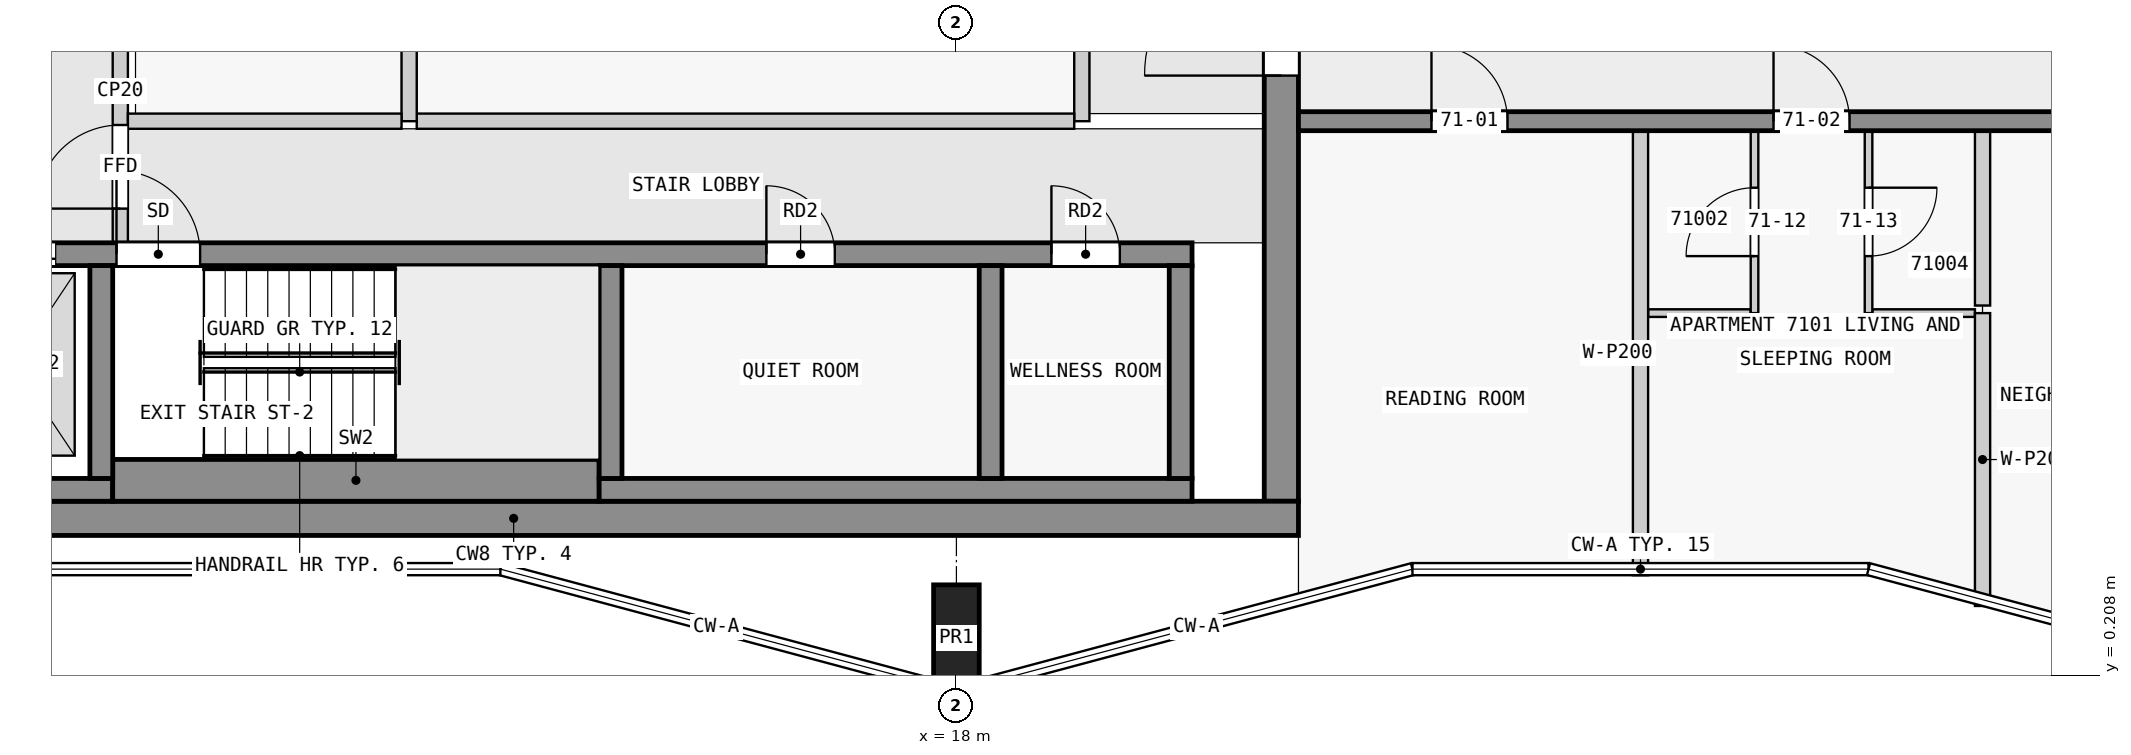
"""IFC4 building model, lengths in metres.
Left out: names, types, materials, properties, quantities, classifications, styles, units other than length and angle.
Written with IfcOpenShell. Run it as: python <this file> out.ifc"""

import sys

from ifc_helpers import new_model, si_unit, direction, frame, frame_2d, origin, origin_2d, place, context, subcontext, project, spatial, rectangle, extrude, element, fill, save


model = new_model("IFC4")
c1 = context("Model", 3, precision=1e-05, world=origin(), true_north=direction((0.0, 1.0)))
c2 = subcontext(c1, "Body", "Model", "MODEL_VIEW")
j1 = project(units=[si_unit("LENGTHUNIT", "METRE"), si_unit("PLANEANGLEUNIT", "RADIAN")], contexts=[c1])
p1 = place(None, origin())
s1 = spatial("IfcSite", under=j1, at=p1, CompositionType="ELEMENT")
p2 = place(p1, origin())
s2 = spatial("IfcBuilding", under=s1, at=p2, CompositionType="ELEMENT")
p3 = place(p2, frame((0.0, 0.0, 270.4)))
s3 = spatial("IfcBuildingStorey", under=s2, at=p3, CompositionType="ELEMENT", Elevation=270.4)
p4 = place(p3, frame((18.0, 0.7, 0.0), z_axis=(0.0, 0.0, 1.0), x_axis=(1.0, 0.0, 0.0)))
e1 = element("IfcColumn", 1, at=p4, inside=s3, PredefinedType="COLUMN", context=c2, shape_type="SweptSolid", body=[
    extrude(rectangle(XDim=0.6, YDim=1.4, at=origin_2d()), origin(), (0.0, 0.0, 1.0), 3.5),
])
p5 = place(p3, frame((1.85, 2.275, 0.0), z_axis=(0.0, 0.0, 1.0), x_axis=(1.0, 0.0, 0.0)))
e2 = element("IfcWall", 2, at=p5, inside=s3, PredefinedType="SHEAR", context=c2, shape_type="SweptSolid", body=[
    extrude(rectangle(XDim=20.65, YDim=0.45, at=frame_2d((10.325, 0.0))), origin(), (0.0, 0.0, 1.0), 3.25),
])
p6 = place(p3, frame((22.275, 2.5, 0.0), z_axis=(0.0, 0.0, 1.0), x_axis=(0.0, 1.0, 0.0)))
e3 = element("IfcWall", 3, at=p6, inside=s3, PredefinedType="SHEAR", context=c2, shape_type="SweptSolid", body=[
    extrude(rectangle(XDim=15.05, YDim=0.45, at=frame_2d((7.525, 0.0))), origin(), (0.0, 0.0, 1.0), 3.25),
])
p7 = place(p6, frame((5.6, 0.0, 0.0)))
e4 = element("IfcOpeningElement", 4, at=p7, cuts=e3, PredefinedType="OPENING", context=c2, shape_type="SweptSolid", body=[
    extrude(rectangle(XDim=1.8, YDim=2.1, at=frame_2d((0.9, 1.05))), frame((0.0, 0.235, 0.0), z_axis=(0.0, -1.0, 0.0), x_axis=(1.0, 0.0, 0.0)), (0.0, 0.0, 1.0), 0.47),
])
p8 = place(p3, frame((2.3, 2.65, 0.0), z_axis=(0.0, 0.0, 1.0), x_axis=(1.0, 0.0, 0.0)))
e5 = element("IfcWall", 5, at=p8, inside=s3, PredefinedType="SHEAR", context=c2, shape_type="SweptSolid", body=[
    extrude(rectangle(XDim=4.6, YDim=0.3, at=frame_2d((2.3, 0.0))), origin(), (0.0, 0.0, 1.0), 3.25),
])
p9 = place(p3, frame((6.9, 2.775, 0.0), z_axis=(0.0, 0.0, 1.0), x_axis=(1.0, 0.0, 0.0)))
e6 = element("IfcWall", 6, at=p9, inside=s3, PredefinedType="SHEAR", context=c2, shape_type="SweptSolid", body=[
    extrude(rectangle(XDim=6.4, YDim=0.55, at=frame_2d((3.2, 0.0))), origin(), (0.0, 0.0, 1.0), 3.25),
])
p10 = place(p3, frame((13.3, 2.65, 0.0), z_axis=(0.0, 0.0, 1.0), x_axis=(1.0, 0.0, 0.0)))
e7 = element("IfcWall", 7, at=p10, inside=s3, PredefinedType="SHEAR", context=c2, shape_type="SweptSolid", body=[
    extrude(rectangle(XDim=7.8, YDim=0.3, at=frame_2d((3.9, 0.0))), origin(), (0.0, 0.0, 1.0), 3.25),
])
for number, where, z_axis, x_axis in (
    (8, (6.75, 2.8, 0.0), (0.0, 0.0, 1.0), (0.0, 1.0, 0.0)),
    (9, (13.45, 2.8, 0.0), (0.0, 0.0, 1.0), (0.0, 1.0, 0.0)),
    (10, (18.45, 2.8, 0.0), (0.0, 0.0, 1.0), (0.0, 1.0, 0.0)),
    (11, (20.95, 2.8, 0.0), (0.0, 0.0, 1.0), (0.0, 1.0, 0.0)),
):
    element("IfcWall", number, at=place(p3, frame(where, z_axis=z_axis, x_axis=x_axis)), inside=s3, PredefinedType="SHEAR", context=c2, shape_type="SweptSolid", body=[
        extrude(rectangle(XDim=2.8, YDim=0.3, at=frame_2d((1.4, 0.0))), origin(), (0.0, 0.0, 1.0), 3.25),
    ])
p11 = place(p3, frame((2.3, 5.75, 0.0), z_axis=(0.0, 0.0, 1.0), x_axis=(1.0, 0.0, 0.0)))
e12 = element("IfcWall", 12, at=p11, inside=s3, PredefinedType="SHEAR", context=c2, shape_type="SweptSolid", body=[
    extrude(rectangle(XDim=18.8, YDim=0.3, at=frame_2d((9.4, 0.0))), origin(), (0.0, 0.0, 1.0), 3.25),
])
p12 = place(p11, frame((4.65, 0.0, 0.0)))
e13 = element("IfcOpeningElement", 13, at=p12, cuts=e12, PredefinedType="OPENING", context=c2, shape_type="SweptSolid", body=[
    extrude(rectangle(XDim=1.1, YDim=2.1, at=frame_2d((0.55, 1.05))), frame((0.0, 0.16, 0.0), z_axis=(0.0, -1.0, 0.0), x_axis=(1.0, 0.0, 0.0)), (0.0, 0.0, 1.0), 0.32),
])
p13 = place(p11, frame((0.45, 0.0, 0.0)))
e14 = element("IfcOpeningElement", 14, at=p13, cuts=e12, PredefinedType="OPENING", context=c2, shape_type="SweptSolid", body=[
    extrude(rectangle(XDim=1.1, YDim=2.1, at=frame_2d((0.55, 1.05))), frame((0.0, 0.16, 0.0), z_axis=(0.0, -1.0, 0.0), x_axis=(1.0, 0.0, 0.0)), (0.0, 0.0, 1.0), 0.32),
])
p14 = place(p11, frame((2.75, 0.0, 0.0)))
e15 = element("IfcOpeningElement", 15, at=p14, cuts=e12, PredefinedType="OPENING", context=c2, shape_type="SweptSolid", body=[
    extrude(rectangle(XDim=1.1, YDim=2.1, at=frame_2d((0.55, 1.05))), frame((0.0, 0.16, 0.0), z_axis=(0.0, -1.0, 0.0), x_axis=(1.0, 0.0, 0.0)), (0.0, 0.0, 1.0), 0.32),
])
p15 = place(p11, frame((13.2, 0.0, 0.0)))
e16 = element("IfcOpeningElement", 16, at=p15, cuts=e12, PredefinedType="OPENING", context=c2, shape_type="SweptSolid", body=[
    extrude(rectangle(XDim=0.9, YDim=2.1, at=frame_2d((0.45, 1.05))), frame((0.0, 0.16, 0.0), z_axis=(0.0, -1.0, 0.0), x_axis=(1.0, 0.0, 0.0)), (0.0, 0.0, 1.0), 0.32),
])
p16 = place(p11, frame((16.95, 0.0, 0.0)))
e17 = element("IfcOpeningElement", 17, at=p16, cuts=e12, PredefinedType="OPENING", context=c2, shape_type="SweptSolid", body=[
    extrude(rectangle(XDim=0.9, YDim=2.1, at=frame_2d((0.45, 1.05))), frame((0.0, 0.16, 0.0), z_axis=(0.0, -1.0, 0.0), x_axis=(1.0, 0.0, 0.0)), (0.0, 0.0, 1.0), 0.32),
])
p17 = place(p3, frame((22.5, 7.5, 0.0), z_axis=(0.0, 0.0, 1.0), x_axis=(1.0, 0.0, 0.0)))
e18 = element("IfcWall", 18, at=p17, inside=s3, PredefinedType="SHEAR", context=c2, shape_type="SweptSolid", body=[
    extrude(rectangle(XDim=22.5, YDim=0.25, at=frame_2d((11.25, 0.0))), origin(), (0.0, 0.0, 1.0), 3.25),
])
p18 = place(p17, frame((1.75, 0.0, 0.0)))
e19 = element("IfcOpeningElement", 19, at=p18, cuts=e18, PredefinedType="OPENING", context=c2, shape_type="SweptSolid", body=[
    extrude(rectangle(XDim=1.0, YDim=2.1, at=frame_2d((0.5, 1.05))), frame((0.0, 0.135, 0.0), z_axis=(0.0, -1.0, 0.0), x_axis=(1.0, 0.0, 0.0)), (0.0, 0.0, 1.0), 0.27),
])
p19 = place(p17, frame((6.25, 0.0, 0.0)))
e20 = element("IfcOpeningElement", 20, at=p19, cuts=e18, PredefinedType="OPENING", context=c2, shape_type="SweptSolid", body=[
    extrude(rectangle(XDim=1.0, YDim=2.1, at=frame_2d((0.5, 1.05))), frame((0.0, 0.135, 0.0), z_axis=(0.0, -1.0, 0.0), x_axis=(1.0, 0.0, 0.0)), (0.0, 0.0, 1.0), 0.27),
])
p20 = place(p17, frame((10.35, 0.0, 0.0)))
e21 = element("IfcOpeningElement", 21, at=p20, cuts=e18, PredefinedType="OPENING", context=c2, shape_type="SweptSolid", body=[
    extrude(rectangle(XDim=1.8, YDim=2.1, at=frame_2d((0.9, 1.05))), frame((0.0, 0.135, 0.0), z_axis=(0.0, -1.0, 0.0), x_axis=(1.0, 0.0, 0.0)), (0.0, 0.0, 1.0), 0.27),
])
p21 = place(p17, frame((15.25, 0.0, 0.0)))
e22 = element("IfcOpeningElement", 22, at=p21, cuts=e18, PredefinedType="OPENING", context=c2, shape_type="SweptSolid", body=[
    extrude(rectangle(XDim=1.0, YDim=2.1, at=frame_2d((0.5, 1.05))), frame((0.0, 0.135, 0.0), z_axis=(0.0, -1.0, 0.0), x_axis=(1.0, 0.0, 0.0)), (0.0, 0.0, 1.0), 0.27),
])
p22 = place(p17, frame((18.75, 0.0, 0.0)))
e23 = element("IfcOpeningElement", 23, at=p22, cuts=e18, PredefinedType="OPENING", context=c2, shape_type="SweptSolid", body=[
    extrude(rectangle(XDim=0.9, YDim=2.1, at=frame_2d((0.45, 1.05))), frame((0.0, 0.135, 0.0), z_axis=(0.0, -1.0, 0.0), x_axis=(1.0, 0.0, 0.0)), (0.0, 0.0, 1.0), 0.27),
])
p23 = place(p17, frame((20.95, 0.0, 0.0)))
e24 = element("IfcOpeningElement", 24, at=p23, cuts=e18, PredefinedType="OPENING", context=c2, shape_type="SweptSolid", body=[
    extrude(rectangle(XDim=1.0, YDim=2.1, at=frame_2d((0.5, 1.05))), frame((0.0, 0.135, 0.0), z_axis=(0.0, -1.0, 0.0), x_axis=(1.0, 0.0, 0.0)), (0.0, 0.0, 1.0), 0.27),
])
p24 = place(p3, frame((7.0, 5.9, 0.0), z_axis=(0.0, 0.0, 1.0), x_axis=(0.0, 1.0, 0.0)))
e25 = element("IfcWall", 25, at=p24, inside=s3, PredefinedType="PARTITIONING", context=c2, shape_type="SweptSolid", body=[
    extrude(rectangle(XDim=4.0, YDim=0.2, at=frame_2d((2.0, 0.0))), origin(), (0.0, 0.0, 1.0), 3.25),
])
p25 = place(p24, frame((0.45, 0.0, 0.0)))
e26 = element("IfcOpeningElement", 26, at=p25, cuts=e25, PredefinedType="OPENING", context=c2, shape_type="SweptSolid", body=[
    extrude(rectangle(XDim=1.1, YDim=2.1, at=frame_2d((0.55, 1.05))), frame((0.0, 0.11, 0.0), z_axis=(0.0, -1.0, 0.0), x_axis=(1.0, 0.0, 0.0)), (0.0, 0.0, 1.0), 0.22),
])
p26 = place(p3, frame((7.1, 7.5, 0.0), z_axis=(0.0, 0.0, 1.0), x_axis=(1.0, 0.0, 0.0)))
e27 = element("IfcWall", 27, at=p26, inside=s3, PredefinedType="PARTITIONING", context=c2, shape_type="SweptSolid", body=[
    extrude(rectangle(XDim=3.6, YDim=0.2, at=frame_2d((1.8, 0.0))), origin(), (0.0, 0.0, 1.0), 3.25),
])
p27 = place(p3, frame((10.8, 7.5, 0.0), z_axis=(0.0, 0.0, 1.0), x_axis=(0.0, 1.0, 0.0)))
e28 = element("IfcWall", 28, at=p27, inside=s3, PredefinedType="PARTITIONING", context=c2, shape_type="SweptSolid", body=[
    extrude(rectangle(XDim=4.7, YDim=0.2, at=frame_2d((2.35, 0.0))), origin(), (0.0, 0.0, 1.0), 3.25),
])
p28 = place(p3, frame((10.9, 7.5, 0.0), z_axis=(0.0, 0.0, 1.0), x_axis=(1.0, 0.0, 0.0)))
e29 = element("IfcWall", 29, at=p28, inside=s3, PredefinedType="PARTITIONING", context=c2, shape_type="SweptSolid", body=[
    extrude(rectangle(XDim=8.65, YDim=0.2, at=frame_2d((4.325, 0.0))), origin(), (0.0, 0.0, 1.0), 3.25),
])
p29 = place(p3, frame((19.65, 7.5, 0.0), z_axis=(0.0, 0.0, 1.0), x_axis=(0.0, 1.0, 0.0)))
e30 = element("IfcWall", 30, at=p29, inside=s3, PredefinedType="PARTITIONING", context=c2, shape_type="SweptSolid", body=[
    extrude(rectangle(XDim=4.7, YDim=0.2, at=frame_2d((2.35, 0.0))), origin(), (0.0, 0.0, 1.0), 3.25),
])
for number, where, z_axis, x_axis in (
    (31, (27.1, 4.975, 0.0), (0.0, 0.0, 1.0), (1.0, 0.0, 0.0)),
    (32, (30.05, 4.975, 0.0), (0.0, 0.0, 1.0), (1.0, 0.0, 0.0)),
):
    element("IfcWall", number, at=place(p3, frame(where, z_axis=z_axis, x_axis=x_axis)), inside=s3, PredefinedType="PARTITIONING", context=c2, shape_type="SweptSolid", body=[
        extrude(rectangle(XDim=1.35, YDim=0.1, at=frame_2d((0.675, 0.0))), origin(), (0.0, 0.0, 1.0), 3.25),
    ])
p30 = place(p3, frame((27.0, 1.527, 0.0), z_axis=(0.0, 0.0, 1.0), x_axis=(0.0, 1.0, 0.0)))
e33 = element("IfcWall", 33, at=p30, inside=s3, PredefinedType="PARTITIONING", context=c2, shape_type="SweptSolid", body=[
    extrude(rectangle(XDim=5.848, YDim=0.2, at=frame_2d((2.924, 0.0))), origin(), (0.0, 0.0, 1.0), 3.25),
])
p31 = place(p3, frame((28.5, 4.975, 0.0), z_axis=(0.0, 0.0, 1.0), x_axis=(0.0, 1.0, 0.0)))
e34 = element("IfcWall", 34, at=p31, inside=s3, PredefinedType="PARTITIONING", context=c2, shape_type="SweptSolid", body=[
    extrude(rectangle(XDim=2.4, YDim=0.1, at=frame_2d((1.2, 0.0))), origin(), (0.0, 0.0, 1.0), 3.25),
])
p32 = place(p31, frame((0.75, 0.0, 0.0)))
e35 = element("IfcOpeningElement", 35, at=p32, cuts=e34, PredefinedType="OPENING", context=c2, shape_type="SweptSolid", body=[
    extrude(rectangle(XDim=0.9, YDim=2.1, at=frame_2d((0.45, 1.05))), frame((0.0, 0.06, 0.0), z_axis=(0.0, -1.0, 0.0), x_axis=(1.0, 0.0, 0.0)), (0.0, 0.0, 1.0), 0.12),
])
p33 = place(p3, frame((30.0, 7.375, 0.0), z_axis=(0.0, 0.0, 1.0), x_axis=(0.0, -1.0, 0.0)))
e36 = element("IfcWall", 36, at=p33, inside=s3, PredefinedType="PARTITIONING", context=c2, shape_type="SweptSolid", body=[
    extrude(rectangle(XDim=2.4, YDim=0.1, at=frame_2d((1.2, 0.0))), origin(), (0.0, 0.0, 1.0), 3.25),
])
p34 = place(p33, frame((0.75, 0.0, 0.0)))
e37 = element("IfcOpeningElement", 37, at=p34, cuts=e36, PredefinedType="OPENING", context=c2, shape_type="SweptSolid", body=[
    extrude(rectangle(XDim=0.9, YDim=2.1, at=frame_2d((0.45, 1.05))), frame((0.0, 0.06, 0.0), z_axis=(0.0, -1.0, 0.0), x_axis=(1.0, 0.0, 0.0)), (0.0, 0.0, 1.0), 0.12),
])
p35 = place(p3, frame((31.5, 4.975, 0.0), z_axis=(0.0, 0.0, 1.0), x_axis=(0.0, -1.0, 0.0)))
e38 = element("IfcWall", 38, at=p35, inside=s3, PredefinedType="PARTITIONING", context=c2, shape_type="SweptSolid", body=[
    extrude(rectangle(XDim=3.853, YDim=0.2, at=frame_2d((1.926, 0.0))), origin(), (0.0, 0.0, 1.0), 3.25),
])
p36 = place(p3, frame((31.5, 5.075, 0.0), z_axis=(0.0, 0.0, 1.0), x_axis=(0.0, 1.0, 0.0)))
e39 = element("IfcWall", 39, at=p36, inside=s3, PredefinedType="PARTITIONING", context=c2, shape_type="SweptSolid", body=[
    extrude(rectangle(XDim=2.3, YDim=0.2, at=frame_2d((1.15, 0.0))), origin(), (0.0, 0.0, 1.0), 3.25),
])
p37 = place(p25, origin())
e40 = element("IfcDoor", 40, at=p37, inside=s3, OperationType="SINGLE_SWING_LEFT", PredefinedType="DOOR", context=c2, shape_type="SweptSolid", body=[
    extrude(rectangle(XDim=1.1, YDim=2.1, at=frame_2d((0.55, 1.05))), frame((0.0, 0.025, 0.0), z_axis=(0.0, -1.0, 0.0), x_axis=(1.0, 0.0, 0.0)), (0.0, 0.0, 1.0), 0.05),
])
fill(e26, e40)
p38 = place(p12, origin())
e41 = element("IfcDoor", 41, at=p38, inside=s3, OperationType="SINGLE_SWING_LEFT", PredefinedType="DOOR", context=c2, shape_type="SweptSolid", body=[
    extrude(rectangle(XDim=1.1, YDim=2.1, at=frame_2d((0.55, 1.05))), frame((0.0, 0.025, 0.0), z_axis=(0.0, -1.0, 0.0), x_axis=(1.0, 0.0, 0.0)), (0.0, 0.0, 1.0), 0.05),
])
fill(e13, e41)
p39 = place(p14, origin())
e42 = element("IfcDoor", 42, at=p39, inside=s3, OperationType="DOUBLE_DOOR_SLIDING", PredefinedType="DOOR", context=c2, shape_type="SweptSolid", body=[
    extrude(rectangle(XDim=1.1, YDim=2.1, at=frame_2d((0.55, 1.05))), frame((0.0, 0.025, 0.0), z_axis=(0.0, -1.0, 0.0), x_axis=(1.0, 0.0, 0.0)), (0.0, 0.0, 1.0), 0.05),
])
fill(e15, e42)
p40 = place(p7, origin())
e43 = element("IfcDoor", 43, at=p40, inside=s3, OperationType="DOUBLE_DOOR_SINGLE_SWING", PredefinedType="DOOR", context=c2, shape_type="SweptSolid", body=[
    extrude(rectangle(XDim=1.8, YDim=2.1, at=frame_2d((0.9, 1.05))), frame((0.0, 0.025, 0.0), z_axis=(0.0, -1.0, 0.0), x_axis=(1.0, 0.0, 0.0)), (0.0, 0.0, 1.0), 0.05),
])
fill(e4, e43)
p41 = place(p15, origin())
e44 = element("IfcDoor", 44, at=p41, inside=s3, OperationType="SINGLE_SWING_LEFT", PredefinedType="DOOR", context=c2, shape_type="SweptSolid", body=[
    extrude(rectangle(XDim=0.9, YDim=2.1, at=frame_2d((0.45, 1.05))), frame((0.0, 0.025, 0.0), z_axis=(0.0, -1.0, 0.0), x_axis=(1.0, 0.0, 0.0)), (0.0, 0.0, 1.0), 0.05),
])
fill(e16, e44)
p42 = place(p16, origin())
e45 = element("IfcDoor", 45, at=p42, inside=s3, OperationType="SINGLE_SWING_LEFT", PredefinedType="DOOR", context=c2, shape_type="SweptSolid", body=[
    extrude(rectangle(XDim=0.9, YDim=2.1, at=frame_2d((0.45, 1.05))), frame((0.0, 0.025, 0.0), z_axis=(0.0, -1.0, 0.0), x_axis=(1.0, 0.0, 0.0)), (0.0, 0.0, 1.0), 0.05),
])
fill(e17, e45)
p43 = place(p18, origin())
e46 = element("IfcDoor", 46, at=p43, inside=s3, OperationType="SINGLE_SWING_LEFT", PredefinedType="DOOR", context=c2, shape_type="SweptSolid", body=[
    extrude(rectangle(XDim=1.0, YDim=2.1, at=frame_2d((0.5, 1.05))), frame((0.0, 0.025, 0.0), z_axis=(0.0, -1.0, 0.0), x_axis=(1.0, 0.0, 0.0)), (0.0, 0.0, 1.0), 0.05),
])
fill(e19, e46)
p44 = place(p19, origin())
e47 = element("IfcDoor", 47, at=p44, inside=s3, OperationType="SINGLE_SWING_LEFT", PredefinedType="DOOR", context=c2, shape_type="SweptSolid", body=[
    extrude(rectangle(XDim=1.0, YDim=2.1, at=frame_2d((0.5, 1.05))), frame((0.0, 0.025, 0.0), z_axis=(0.0, -1.0, 0.0), x_axis=(1.0, 0.0, 0.0)), (0.0, 0.0, 1.0), 0.05),
])
fill(e20, e47)
p45 = place(p32, origin())
e48 = element("IfcDoor", 48, at=p45, inside=s3, OperationType="SINGLE_SWING_LEFT", PredefinedType="DOOR", context=c2, shape_type="SweptSolid", body=[
    extrude(rectangle(XDim=0.9, YDim=2.1, at=frame_2d((0.45, 1.05))), frame((0.0, 0.025, 0.0), z_axis=(0.0, -1.0, 0.0), x_axis=(1.0, 0.0, 0.0)), (0.0, 0.0, 1.0), 0.05),
])
fill(e35, e48)
p46 = place(p34, origin())
e49 = element("IfcDoor", 49, at=p46, inside=s3, OperationType="SINGLE_SWING_LEFT", PredefinedType="DOOR", context=c2, shape_type="SweptSolid", body=[
    extrude(rectangle(XDim=0.9, YDim=2.1, at=frame_2d((0.45, 1.05))), frame((0.0, 0.025, 0.0), z_axis=(0.0, -1.0, 0.0), x_axis=(1.0, 0.0, 0.0)), (0.0, 0.0, 1.0), 0.05),
])
fill(e37, e49)
save(model, sys.argv[1])
